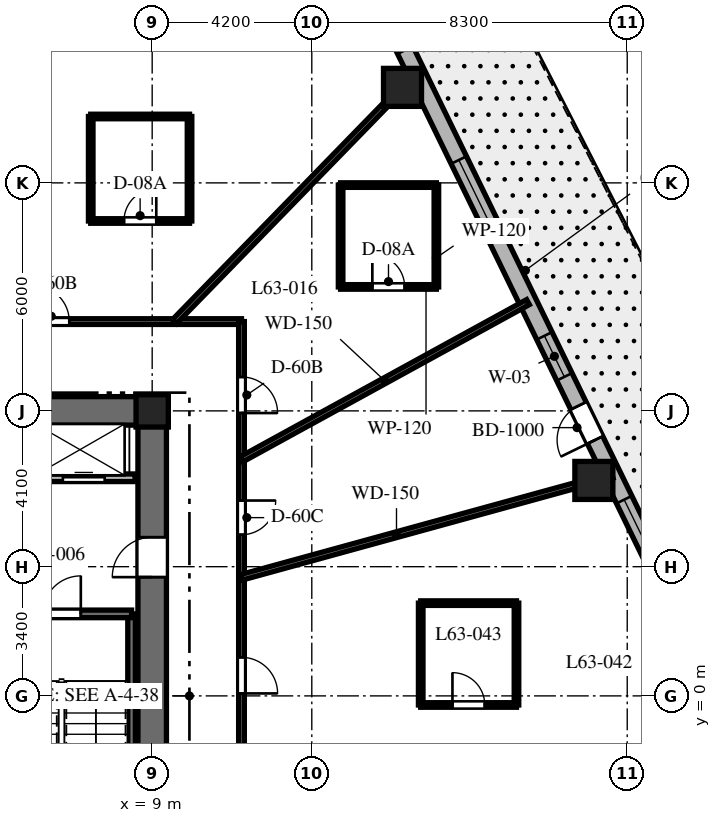
"""IFC4 building model, lengths in metres.
Left out: names, types, materials, properties, quantities, classifications, styles, units other than length and angle.
Written with IfcOpenShell. Run it as: python <this file> out.ifc"""

import sys

from ifc_helpers import new_model, si_unit, direction, frame, frame_2d, origin, origin_2d, place, context, subcontext, project, spatial, rectangle, extrude, element, fill, save


model = new_model("IFC4")
c1 = context("Model", 3, precision=1e-05, world=origin(), true_north=direction((0.0, 1.0)))
c2 = subcontext(c1, "Body", "Model", "MODEL_VIEW")
j1 = project(units=[si_unit("LENGTHUNIT", "METRE"), si_unit("PLANEANGLEUNIT", "RADIAN")], contexts=[c1])
p1 = place(None, origin())
s1 = spatial("IfcSite", under=j1, at=p1, CompositionType="ELEMENT")
p2 = place(p1, origin())
s2 = spatial("IfcBuilding", under=s1, at=p2, CompositionType="ELEMENT")
p3 = place(p2, frame((0.0, 0.0, 252.1)))
s3 = spatial("IfcBuildingStorey", under=s2, at=p3, CompositionType="ELEMENT", Elevation=252.1)
p4 = place(p3, frame((1.85, 7.5, 0.0), z_axis=(0.0, 0.0, 1.0), x_axis=(1.0, 0.0, 0.0)))
e1 = element("IfcWall", 1, at=p4, inside=s3, PredefinedType="SHEAR", context=c2, shape_type="SweptSolid", body=[
    extrude(rectangle(XDim=7.525, YDim=0.75, at=frame_2d((3.762, 0.0))), origin(), (0.0, 0.0, 1.0), 3.8),
])
p5 = place(p3, frame((9.0, -7.125, 0.0), z_axis=(0.0, 0.0, 1.0), x_axis=(0.0, 1.0, 0.0)))
e2 = element("IfcWall", 2, at=p5, inside=s3, PredefinedType="SHEAR", context=c2, shape_type="SweptSolid", body=[
    extrude(rectangle(XDim=14.25, YDim=0.75, at=frame_2d((7.125, 0.0))), origin(), (0.0, 0.0, 1.0), 3.8),
])
p6 = place(p5, frame((10.25, 0.0, 0.0)))
e3 = element("IfcOpeningElement", 3, at=p6, cuts=e2, PredefinedType="OPENING", context=c2, shape_type="SweptSolid", body=[
    extrude(rectangle(XDim=1.05, YDim=2.15, at=frame_2d((0.525, 1.075))), frame((0.0, 0.385, 0.0), z_axis=(0.0, -1.0, 0.0), x_axis=(1.0, 0.0, 0.0)), (0.0, 0.0, 1.0), 0.77),
])
p7 = place(p3, frame((8.458, -6.985, 0.0), z_axis=(0.0, 0.0, 1.0), x_axis=(0.0, 1.0, 0.0)))
e4 = element("IfcWall", 4, at=p7, inside=s3, PredefinedType="SHEAR", context=c2, shape_type="SweptSolid", body=[
    extrude(rectangle(XDim=9.143, YDim=0.2, at=frame_2d((4.572, 0.0))), origin(), (0.0, 0.0, 1.0), 3.8),
])
p8 = place(p3, frame((4.772, 2.158, 0.0), z_axis=(0.0, 0.0, 1.0), x_axis=(1.0, 0.0, 0.0)))
e5 = element("IfcWall", 5, at=p8, inside=s3, PredefinedType="SHEAR", context=c2, shape_type="SweptSolid", body=[
    extrude(rectangle(XDim=3.686, YDim=0.2, at=frame_2d((1.843, 0.0))), origin(), (0.0, 0.0, 1.0), 3.8),
])
p9 = place(p8, frame((1.35, 0.0, 0.0)))
e6 = element("IfcOpeningElement", 6, at=p9, cuts=e5, PredefinedType="OPENING", context=c2, shape_type="SweptSolid", body=[
    extrude(rectangle(XDim=1.0, YDim=2.15, at=frame_2d((0.5, 1.075))), frame((0.0, 0.11, 0.0), z_axis=(0.0, -1.0, 0.0), x_axis=(1.0, 0.0, 0.0)), (0.0, 0.0, 1.0), 0.22),
])
p10 = place(p3, frame((9.0, 7.5, 0.0), z_axis=(0.0, 0.0, 1.0), x_axis=(1.0, 0.0, 0.0)))
e7 = element("IfcColumn", 7, at=p10, inside=s3, PredefinedType="COLUMN", context=c2, shape_type="SweptSolid", body=[
    extrude(rectangle(XDim=0.85, YDim=0.85, at=origin_2d()), origin(), (0.0, 0.0, 1.0), 3.8),
])
for number, where, z_axis, x_axis in (
    (8, (20.622, 5.67, 0.0), (0.0, 0.0, 1.0), (1.0, 0.0, 0.0)),
    (9, (15.587, 16.013, 0.0), (0.0, 0.0, 1.0), (1.0, 0.0, 0.0)),
):
    element("IfcColumn", number, at=place(p3, frame(where, z_axis=z_axis, x_axis=x_axis)), inside=s3, PredefinedType="COLUMN", context=c2, shape_type="SweptSolid", body=[
        extrude(rectangle(XDim=1.0, YDim=1.0, at=origin_2d()), origin(), (0.0, 0.0, 1.0), 3.8),
    ])
p11 = place(p3, frame((16.324, -19.275, 0.0), z_axis=(0.0, 0.0, 1.0), x_axis=(0.325083142304, 0.945685439557, 0.0)))
e10 = element("IfcWall", 10, at=p11, inside=s3, PredefinedType="SOLIDWALL", context=c2, shape_type="SweptSolid", body=[
    extrude(rectangle(XDim=20.224, YDim=0.45, at=frame_2d((10.112, 0.0))), origin(), (0.0, 0.0, 1.0), 3.48),
])
p12 = place(p11, frame((1.253, 0.0, 0.8)))
e11 = element("IfcOpeningElement", 11, at=p12, cuts=e10, PredefinedType="OPENING", context=c2, shape_type="SweptSolid", body=[
    extrude(rectangle(XDim=1.5, YDim=1.8, at=frame_2d((0.75, 0.9))), frame((0.0, 0.235, 0.0), z_axis=(0.0, -1.0, 0.0), x_axis=(1.0, 0.0, 0.0)), (0.0, 0.0, 1.0), 0.47),
])
p13 = place(p11, frame((6.568, 0.0, 0.8)))
e12 = element("IfcOpeningElement", 12, at=p13, cuts=e10, PredefinedType="OPENING", context=c2, shape_type="SweptSolid", body=[
    extrude(rectangle(XDim=1.5, YDim=1.8, at=frame_2d((0.75, 0.9))), frame((0.0, 0.235, 0.0), z_axis=(0.0, -1.0, 0.0), x_axis=(1.0, 0.0, 0.0)), (0.0, 0.0, 1.0), 0.47),
])
p14 = place(p11, frame((12.25, 0.0, 0.8)))
e13 = element("IfcOpeningElement", 13, at=p14, cuts=e10, PredefinedType="OPENING", context=c2, shape_type="SweptSolid", body=[
    extrude(rectangle(XDim=1.5, YDim=1.8, at=frame_2d((0.75, 0.9))), frame((0.0, 0.235, 0.0), z_axis=(0.0, -1.0, 0.0), x_axis=(1.0, 0.0, 0.0)), (0.0, 0.0, 1.0), 0.47),
])
p15 = place(p11, frame((17.418, 0.0, 0.8)))
e14 = element("IfcOpeningElement", 14, at=p15, cuts=e10, PredefinedType="OPENING", context=c2, shape_type="SweptSolid", body=[
    extrude(rectangle(XDim=1.5, YDim=1.8, at=frame_2d((0.75, 0.9))), frame((0.0, 0.235, 0.0), z_axis=(0.0, -1.0, 0.0), x_axis=(1.0, 0.0, 0.0)), (0.0, 0.0, 1.0), 0.47),
])
p16 = place(p3, frame((22.74, 2.452, 0.0), z_axis=(0.0, 0.0, 1.0), x_axis=(-0.437753424814, 0.899095066755, 0.0)))
e15 = element("IfcWall", 15, at=p16, inside=s3, PredefinedType="SOLIDWALL", context=c2, shape_type="SweptSolid", body=[
    extrude(rectangle(XDim=19.137, YDim=0.45, at=frame_2d((9.569, 0.0))), origin(), (0.0, 0.0, 1.0), 3.48),
])
p17 = place(p16, frame((4.763, 0.0, 0.0)))
e16 = element("IfcOpeningElement", 16, at=p17, cuts=e15, PredefinedType="OPENING", context=c2, shape_type="SweptSolid", body=[
    extrude(rectangle(XDim=1.0, YDim=2.15, at=frame_2d((0.5, 1.075))), frame((0.0, 0.235, 0.0), z_axis=(0.0, -1.0, 0.0), x_axis=(1.0, 0.0, 0.0)), (0.0, 0.0, 1.0), 0.47),
])
p18 = place(p16, frame((6.611, 0.0, 0.8)))
e17 = element("IfcOpeningElement", 17, at=p18, cuts=e15, PredefinedType="OPENING", context=c2, shape_type="SweptSolid", body=[
    extrude(rectangle(XDim=1.2, YDim=1.8, at=frame_2d((0.6, 0.9))), frame((0.0, 0.235, 0.0), z_axis=(0.0, -1.0, 0.0), x_axis=(1.0, 0.0, 0.0)), (0.0, 0.0, 1.0), 0.47),
])
p19 = place(p16, frame((10.856, 0.0, 0.8)))
e18 = element("IfcOpeningElement", 18, at=p19, cuts=e15, PredefinedType="OPENING", context=c2, shape_type="SweptSolid", body=[
    extrude(rectangle(XDim=2.1, YDim=1.85, at=frame_2d((1.05, 0.925))), frame((0.0, 0.235, 0.0), z_axis=(0.0, -1.0, 0.0), x_axis=(1.0, 0.0, 0.0)), (0.0, 0.0, 1.0), 0.47),
])
p20 = place(p16, frame((16.173, 0.0, 0.8)))
e19 = element("IfcOpeningElement", 19, at=p20, cuts=e15, PredefinedType="OPENING", context=c2, shape_type="SweptSolid", body=[
    extrude(rectangle(XDim=2.1, YDim=1.85, at=frame_2d((1.05, 0.925))), frame((0.0, 0.235, 0.0), z_axis=(0.0, -1.0, 0.0), x_axis=(1.0, 0.0, 0.0)), (0.0, 0.0, 1.0), 0.47),
])
p21 = place(p16, frame((0.916, 0.0, 0.8)))
e20 = element("IfcOpeningElement", 20, at=p21, cuts=e15, PredefinedType="OPENING", context=c2, shape_type="SweptSolid", body=[
    extrude(rectangle(XDim=2.1, YDim=1.85, at=frame_2d((1.05, 0.925))), frame((0.0, 0.235, 0.0), z_axis=(0.0, -1.0, 0.0), x_axis=(1.0, 0.0, 0.0)), (0.0, 0.0, 1.0), 0.47),
])
p22 = place(p3, frame((4.5, 5.74, 0.0), z_axis=(0.0, 0.0, 1.0), x_axis=(1.0, 0.0, 0.0)))
e21 = element("IfcWall", 21, at=p22, inside=s3, PredefinedType="PARTITIONING", context=c2, shape_type="SweptSolid", body=[
    extrude(rectangle(XDim=4.05, YDim=0.2, at=frame_2d((2.025, 0.0))), origin(), (0.0, 0.0, 1.0), 3.48),
])
p23 = place(p22, frame((0.3, 0.0, 0.0)))
e22 = element("IfcOpeningElement", 22, at=p23, cuts=e21, PredefinedType="OPENING", context=c2, shape_type="SweptSolid", body=[
    extrude(rectangle(XDim=0.85, YDim=2.03, at=frame_2d((0.425, 1.015))), frame((0.0, 0.11, 0.0), z_axis=(0.0, -1.0, 0.0), x_axis=(1.0, 0.0, 0.0)), (0.0, 0.0, 1.0), 0.22),
])
p24 = place(p22, frame((2.15, 0.0, 0.0)))
e23 = element("IfcOpeningElement", 23, at=p24, cuts=e21, PredefinedType="OPENING", context=c2, shape_type="SweptSolid", body=[
    extrude(rectangle(XDim=1.1, YDim=2.2, at=frame_2d((0.55, 1.1))), frame((0.0, 0.11, 0.0), z_axis=(0.0, -1.0, 0.0), x_axis=(1.0, 0.0, 0.0)), (0.0, 0.0, 1.0), 0.22),
])
p25 = place(p3, frame((0.92, 9.85, 0.0), z_axis=(0.0, 0.0, 1.0), x_axis=(1.0, 0.0, 0.0)))
e24 = element("IfcWall", 24, at=p25, inside=s3, PredefinedType="PARTITIONING", context=c2, shape_type="SweptSolid", body=[
    extrude(rectangle(XDim=10.43, YDim=0.15, at=frame_2d((5.215, 0.0))), origin(), (0.0, 0.0, 1.0), 2.97),
])
p26 = place(p25, frame((4.949, 0.0, 0.0)))
e25 = element("IfcOpeningElement", 25, at=p26, cuts=e24, PredefinedType="OPENING", context=c2, shape_type="SweptSolid", body=[
    extrude(rectangle(XDim=0.95, YDim=2.03, at=frame_2d((0.475, 1.015))), frame((0.0, 0.085, 0.0), z_axis=(0.0, -1.0, 0.0), x_axis=(1.0, 0.0, 0.0)), (0.0, 0.0, 1.0), 0.17),
])
p27 = place(p3, frame((11.35, 9.85, 0.0), z_axis=(0.0, 0.0, 1.0), x_axis=(0.0, -1.0, 0.0)))
e26 = element("IfcWall", 26, at=p27, inside=s3, PredefinedType="PARTITIONING", context=c2, shape_type="SweptSolid", body=[
    extrude(rectangle(XDim=12.4, YDim=0.15, at=frame_2d((6.2, 0.0))), origin(), (0.0, 0.0, 1.0), 2.97),
])
p28 = place(p27, frame((4.709, 0.0, 0.0)))
e27 = element("IfcOpeningElement", 27, at=p28, cuts=e26, PredefinedType="OPENING", context=c2, shape_type="SweptSolid", body=[
    extrude(rectangle(XDim=0.9, YDim=2.03, at=frame_2d((0.45, 1.015))), frame((0.0, 0.085, 0.0), z_axis=(0.0, -1.0, 0.0), x_axis=(1.0, 0.0, 0.0)), (0.0, 0.0, 1.0), 0.17),
])
p29 = place(p27, frame((1.457, 0.0, 0.0)))
e28 = element("IfcOpeningElement", 28, at=p29, cuts=e26, PredefinedType="OPENING", context=c2, shape_type="SweptSolid", body=[
    extrude(rectangle(XDim=0.95, YDim=2.03, at=frame_2d((0.475, 1.015))), frame((0.0, 0.085, 0.0), z_axis=(0.0, -1.0, 0.0), x_axis=(1.0, 0.0, 0.0)), (0.0, 0.0, 1.0), 0.17),
])
p30 = place(p27, frame((8.835, 0.0, 0.0)))
e29 = element("IfcOpeningElement", 29, at=p30, cuts=e26, PredefinedType="OPENING", context=c2, shape_type="SweptSolid", body=[
    extrude(rectangle(XDim=0.95, YDim=2.03, at=frame_2d((0.475, 1.015))), frame((0.0, 0.085, 0.0), z_axis=(0.0, -1.0, 0.0), x_axis=(1.0, 0.0, 0.0)), (0.0, 0.0, 1.0), 0.17),
])
p31 = place(p3, frame((11.35, 3.121, 0.0), z_axis=(0.0, 0.0, 1.0), x_axis=(0.964212793822, 0.265129568758, 0.0)))
e30 = element("IfcWall", 30, at=p31, inside=s3, PredefinedType="PARTITIONING", context=c2, shape_type="SweptSolid", body=[
    extrude(rectangle(XDim=10.12, YDim=0.15, at=frame_2d((5.06, 0.0))), origin(), (0.0, 0.0, 1.0), 2.72),
])
p32 = place(p3, frame((11.35, 6.227, 0.0), z_axis=(0.0, 0.0, 1.0), x_axis=(0.876723190824, 0.480995266786, 0.0)))
e31 = element("IfcWall", 31, at=p32, inside=s3, PredefinedType="PARTITIONING", context=c2, shape_type="SweptSolid", body=[
    extrude(rectangle(XDim=8.598, YDim=0.15, at=frame_2d((4.299, 0.0))), origin(), (0.0, 0.0, 1.0), 2.72),
])
p33 = place(p3, frame((9.588, 9.85, 0.0), z_axis=(0.0, 0.0, 1.0), x_axis=(0.697519469595, 0.716565830567, 0.0)))
e32 = element("IfcWall", 32, at=p33, inside=s3, PredefinedType="PARTITIONING", context=c2, shape_type="SweptSolid", body=[
    extrude(rectangle(XDim=9.126, YDim=0.15, at=frame_2d((4.563, 0.0))), origin(), (0.0, 0.0, 1.0), 2.72),
])
p34 = place(p3, frame((3.004, 9.85, 0.0), z_axis=(0.0, 0.0, 1.0), x_axis=(0.291775760688, 0.956486751333, 0.0)))
e33 = element("IfcWall", 33, at=p34, inside=s3, PredefinedType="PARTITIONING", context=c2, shape_type="SweptSolid", body=[
    extrude(rectangle(XDim=12.258, YDim=0.15, at=frame_2d((6.129, 0.0))), origin(), (0.0, 0.0, 1.0), 2.72),
])
p35 = place(p3, frame((13.958, 10.762, 0.0), z_axis=(0.0, 0.0, 1.0), x_axis=(1.0, 0.0, 0.0)))
e34 = element("IfcWall", 34, at=p35, inside=s3, PredefinedType="PARTITIONING", context=c2, shape_type="SweptSolid", body=[
    extrude(rectangle(XDim=2.52, YDim=0.12, at=frame_2d((1.26, 0.0))), origin(), (0.0, 0.0, 1.0), 3.006),
])
p36 = place(p35, frame((0.835, 0.0, 0.0)))
e35 = element("IfcOpeningElement", 35, at=p36, cuts=e34, PredefinedType="OPENING", context=c2, shape_type="SweptSolid", body=[
    extrude(rectangle(XDim=0.85, YDim=2.03, at=frame_2d((0.425, 1.015))), frame((0.0, 0.07, 0.0), z_axis=(0.0, -1.0, 0.0), x_axis=(1.0, 0.0, 0.0)), (0.0, 0.0, 1.0), 0.14),
])
p37 = place(p3, frame((16.478, 10.762, 0.0), z_axis=(0.0, 0.0, 1.0), x_axis=(0.0, 1.0, 0.0)))
e36 = element("IfcWall", 36, at=p37, inside=s3, PredefinedType="PARTITIONING", context=c2, shape_type="SweptSolid", body=[
    extrude(rectangle(XDim=2.68, YDim=0.12, at=frame_2d((1.34, 0.0))), origin(), (0.0, 0.0, 1.0), 3.48),
])
p38 = place(p3, frame((16.478, 13.442, 0.0), z_axis=(0.0, 0.0, 1.0), x_axis=(-1.0, 0.0, 0.0)))
e37 = element("IfcWall", 37, at=p38, inside=s3, PredefinedType="PARTITIONING", context=c2, shape_type="SweptSolid", body=[
    extrude(rectangle(XDim=2.52, YDim=0.12, at=frame_2d((1.26, 0.0))), origin(), (0.0, 0.0, 1.0), 3.48),
])
p39 = place(p3, frame((13.958, 13.442, 0.0), z_axis=(0.0, 0.0, 1.0), x_axis=(0.0, -1.0, 0.0)))
e38 = element("IfcWall", 38, at=p39, inside=s3, PredefinedType="PARTITIONING", context=c2, shape_type="SweptSolid", body=[
    extrude(rectangle(XDim=2.68, YDim=0.12, at=frame_2d((1.34, 0.0))), origin(), (0.0, 0.0, 1.0), 3.006),
])
p40 = place(p3, frame((7.383, 12.497, 0.0), z_axis=(0.0, 0.0, 1.0), x_axis=(1.0, 0.0, 0.0)))
e39 = element("IfcWall", 39, at=p40, inside=s3, PredefinedType="PARTITIONING", context=c2, shape_type="SweptSolid", body=[
    extrude(rectangle(XDim=2.6, YDim=0.12, at=frame_2d((1.3, 0.0))), origin(), (0.0, 0.0, 1.0), 2.92),
])
p41 = place(p40, frame((0.875, 0.0, 0.0)))
e40 = element("IfcOpeningElement", 40, at=p41, cuts=e39, PredefinedType="OPENING", context=c2, shape_type="SweptSolid", body=[
    extrude(rectangle(XDim=0.85, YDim=2.03, at=frame_2d((0.425, 1.015))), frame((0.0, 0.07, 0.0), z_axis=(0.0, -1.0, 0.0), x_axis=(1.0, 0.0, 0.0)), (0.0, 0.0, 1.0), 0.14),
])
p42 = place(p3, frame((9.983, 12.497, 0.0), z_axis=(0.0, 0.0, 1.0), x_axis=(0.0, 1.0, 0.0)))
e41 = element("IfcWall", 41, at=p42, inside=s3, PredefinedType="PARTITIONING", context=c2, shape_type="SweptSolid", body=[
    extrude(rectangle(XDim=2.75, YDim=0.12, at=frame_2d((1.375, 0.0))), origin(), (0.0, 0.0, 1.0), 3.052),
])
p43 = place(p3, frame((9.983, 15.247, 0.0), z_axis=(0.0, 0.0, 1.0), x_axis=(-1.0, 0.0, 0.0)))
e42 = element("IfcWall", 42, at=p43, inside=s3, PredefinedType="PARTITIONING", context=c2, shape_type="SweptSolid", body=[
    extrude(rectangle(XDim=2.6, YDim=0.12, at=frame_2d((1.3, 0.0))), origin(), (0.0, 0.0, 1.0), 3.052),
])
p44 = place(p3, frame((7.383, 15.247, 0.0), z_axis=(0.0, 0.0, 1.0), x_axis=(0.0, -1.0, 0.0)))
e43 = element("IfcWall", 43, at=p44, inside=s3, PredefinedType="PARTITIONING", context=c2, shape_type="SweptSolid", body=[
    extrude(rectangle(XDim=2.75, YDim=0.12, at=frame_2d((1.375, 0.0))), origin(), (0.0, 0.0, 1.0), 2.92),
])
p45 = place(p3, frame((16.066, -0.239, 0.0), z_axis=(0.0, 0.0, 1.0), x_axis=(1.0, 0.0, 0.0)))
e44 = element("IfcWall", 44, at=p45, inside=s3, PredefinedType="PARTITIONING", context=c2, shape_type="SweptSolid", body=[
    extrude(rectangle(XDim=2.52, YDim=0.12, at=frame_2d((1.26, 0.0))), origin(), (0.0, 0.0, 1.0), 2.92),
])
p46 = place(p45, frame((0.835, 0.0, 0.0)))
e45 = element("IfcOpeningElement", 45, at=p46, cuts=e44, PredefinedType="OPENING", context=c2, shape_type="SweptSolid", body=[
    extrude(rectangle(XDim=0.85, YDim=2.03, at=frame_2d((0.425, 1.015))), frame((0.0, 0.07, 0.0), z_axis=(0.0, -1.0, 0.0), x_axis=(1.0, 0.0, 0.0)), (0.0, 0.0, 1.0), 0.14),
])
p47 = place(p3, frame((18.586, -0.239, 0.0), z_axis=(0.0, 0.0, 1.0), x_axis=(0.0, 1.0, 0.0)))
e46 = element("IfcWall", 46, at=p47, inside=s3, PredefinedType="PARTITIONING", context=c2, shape_type="SweptSolid", body=[
    extrude(rectangle(XDim=2.68, YDim=0.12, at=frame_2d((1.34, 0.0))), origin(), (0.0, 0.0, 1.0), 3.48),
])
p48 = place(p3, frame((18.586, 2.441, 0.0), z_axis=(0.0, 0.0, 1.0), x_axis=(-1.0, 0.0, 0.0)))
e47 = element("IfcWall", 47, at=p48, inside=s3, PredefinedType="PARTITIONING", context=c2, shape_type="SweptSolid", body=[
    extrude(rectangle(XDim=2.52, YDim=0.12, at=frame_2d((1.26, 0.0))), origin(), (0.0, 0.0, 1.0), 2.92),
])
p49 = place(p3, frame((16.066, 2.441, 0.0), z_axis=(0.0, 0.0, 1.0), x_axis=(0.0, -1.0, 0.0)))
e48 = element("IfcWall", 48, at=p49, inside=s3, PredefinedType="PARTITIONING", context=c2, shape_type="SweptSolid", body=[
    extrude(rectangle(XDim=2.68, YDim=0.12, at=frame_2d((1.34, 0.0))), origin(), (0.0, 0.0, 1.0), 3.48),
])
p50 = place(p17, origin())
e49 = element("IfcDoor", 49, at=p50, inside=s3, OperationType="SINGLE_SWING_LEFT", PredefinedType="DOOR", context=c2, shape_type="SweptSolid", body=[
    extrude(rectangle(XDim=1.0, YDim=2.15, at=frame_2d((0.5, 1.075))), frame((0.0, 0.025, 0.0), z_axis=(0.0, -1.0, 0.0), x_axis=(1.0, 0.0, 0.0)), (0.0, 0.0, 1.0), 0.05),
])
fill(e16, e49)
p51 = place(p18, origin())
e50 = element("IfcWindow", 50, at=p51, inside=s3, PartitioningType="SINGLE_PANEL", PredefinedType="WINDOW", context=c2, shape_type="SweptSolid", body=[
    extrude(rectangle(XDim=1.2, YDim=1.8, at=frame_2d((0.6, 0.9))), frame((0.0, 0.03, 0.0), z_axis=(0.0, -1.0, 0.0), x_axis=(1.0, 0.0, 0.0)), (0.0, 0.0, 1.0), 0.06),
])
fill(e17, e50)
p52 = place(p19, origin())
e51 = element("IfcWindow", 51, at=p52, inside=s3, PartitioningType="SINGLE_PANEL", PredefinedType="WINDOW", context=c2, shape_type="SweptSolid", body=[
    extrude(rectangle(XDim=2.1, YDim=1.85, at=frame_2d((1.05, 0.925))), frame((0.0, 0.03, 0.0), z_axis=(0.0, -1.0, 0.0), x_axis=(1.0, 0.0, 0.0)), (0.0, 0.0, 1.0), 0.06),
])
fill(e18, e51)
p53 = place(p21, origin())
e52 = element("IfcWindow", 52, at=p53, inside=s3, PartitioningType="SINGLE_PANEL", PredefinedType="WINDOW", context=c2, shape_type="SweptSolid", body=[
    extrude(rectangle(XDim=2.1, YDim=1.85, at=frame_2d((1.05, 0.925))), frame((0.0, 0.03, 0.0), z_axis=(0.0, -1.0, 0.0), x_axis=(1.0, 0.0, 0.0)), (0.0, 0.0, 1.0), 0.06),
])
fill(e20, e52)
p54 = place(p9, origin())
e53 = element("IfcDoor", 53, at=p54, inside=s3, OperationType="SINGLE_SWING_RIGHT", PredefinedType="DOOR", context=c2, shape_type="SweptSolid", body=[
    extrude(rectangle(XDim=1.0, YDim=2.15, at=frame_2d((0.5, 1.075))), frame((0.0, 0.025, 0.0), z_axis=(0.0, -1.0, 0.0), x_axis=(1.0, 0.0, 0.0)), (0.0, 0.0, 1.0), 0.05),
])
fill(e6, e53)
p55 = place(p6, origin())
e54 = element("IfcDoor", 54, at=p55, inside=s3, OperationType="SINGLE_SWING_LEFT", PredefinedType="DOOR", context=c2, shape_type="SweptSolid", body=[
    extrude(rectangle(XDim=1.05, YDim=2.15, at=frame_2d((0.525, 1.075))), frame((0.0, 0.025, 0.0), z_axis=(0.0, -1.0, 0.0), x_axis=(1.0, 0.0, 0.0)), (0.0, 0.0, 1.0), 0.05),
])
fill(e3, e54)
p56 = place(p24, origin())
e55 = element("IfcDoor", 55, at=p56, inside=s3, OperationType="SLIDING_TO_RIGHT", PredefinedType="DOOR", context=c2, shape_type="SweptSolid", body=[
    extrude(rectangle(XDim=1.1, YDim=2.2, at=frame_2d((0.55, 1.1))), frame((0.0, 0.025, 0.0), z_axis=(0.0, -1.0, 0.0), x_axis=(1.0, 0.0, 0.0)), (0.0, 0.0, 1.0), 0.05),
])
fill(e23, e55)
p57 = place(p28, origin())
e56 = element("IfcDoor", 56, at=p57, inside=s3, OperationType="SINGLE_SWING_LEFT", PredefinedType="DOOR", context=c2, shape_type="SweptSolid", body=[
    extrude(rectangle(XDim=0.9, YDim=2.03, at=frame_2d((0.45, 1.015))), frame((0.0, 0.025, 0.0), z_axis=(0.0, -1.0, 0.0), x_axis=(1.0, 0.0, 0.0)), (0.0, 0.0, 1.0), 0.05),
])
fill(e27, e56)
p58 = place(p29, origin())
e57 = element("IfcDoor", 57, at=p58, inside=s3, OperationType="SINGLE_SWING_RIGHT", PredefinedType="DOOR", context=c2, shape_type="SweptSolid", body=[
    extrude(rectangle(XDim=0.95, YDim=2.03, at=frame_2d((0.475, 1.015))), frame((0.0, 0.025, 0.0), z_axis=(0.0, -1.0, 0.0), x_axis=(1.0, 0.0, 0.0)), (0.0, 0.0, 1.0), 0.05),
])
fill(e28, e57)
p59 = place(p36, origin())
e58 = element("IfcDoor", 58, at=p59, inside=s3, OperationType="SINGLE_SWING_LEFT", PredefinedType="DOOR", context=c2, shape_type="SweptSolid", body=[
    extrude(rectangle(XDim=0.85, YDim=2.03, at=frame_2d((0.425, 1.015))), frame((0.0, 0.025, 0.0), z_axis=(0.0, -1.0, 0.0), x_axis=(1.0, 0.0, 0.0)), (0.0, 0.0, 1.0), 0.05),
])
fill(e35, e58)
p60 = place(p26, origin())
e59 = element("IfcDoor", 59, at=p60, inside=s3, OperationType="SINGLE_SWING_LEFT", PredefinedType="DOOR", context=c2, shape_type="SweptSolid", body=[
    extrude(rectangle(XDim=0.95, YDim=2.03, at=frame_2d((0.475, 1.015))), frame((0.0, 0.025, 0.0), z_axis=(0.0, -1.0, 0.0), x_axis=(1.0, 0.0, 0.0)), (0.0, 0.0, 1.0), 0.05),
])
fill(e25, e59)
p61 = place(p41, origin())
e60 = element("IfcDoor", 60, at=p61, inside=s3, OperationType="SINGLE_SWING_RIGHT", PredefinedType="DOOR", context=c2, shape_type="SweptSolid", body=[
    extrude(rectangle(XDim=0.85, YDim=2.03, at=frame_2d((0.425, 1.015))), frame((0.0, 0.025, 0.0), z_axis=(0.0, -1.0, 0.0), x_axis=(1.0, 0.0, 0.0)), (0.0, 0.0, 1.0), 0.05),
])
fill(e40, e60)
p62 = place(p30, origin())
e61 = element("IfcDoor", 61, at=p62, inside=s3, OperationType="SINGLE_SWING_RIGHT", PredefinedType="DOOR", context=c2, shape_type="SweptSolid", body=[
    extrude(rectangle(XDim=0.95, YDim=2.03, at=frame_2d((0.475, 1.015))), frame((0.0, 0.025, 0.0), z_axis=(0.0, -1.0, 0.0), x_axis=(1.0, 0.0, 0.0)), (0.0, 0.0, 1.0), 0.05),
])
fill(e29, e61)
p63 = place(p46, origin())
e62 = element("IfcDoor", 62, at=p63, inside=s3, OperationType="SINGLE_SWING_LEFT", PredefinedType="DOOR", context=c2, shape_type="SweptSolid", body=[
    extrude(rectangle(XDim=0.85, YDim=2.03, at=frame_2d((0.425, 1.015))), frame((0.0, 0.025, 0.0), z_axis=(0.0, -1.0, 0.0), x_axis=(1.0, 0.0, 0.0)), (0.0, 0.0, 1.0), 0.05),
])
fill(e45, e62)
save(model, sys.argv[1])
